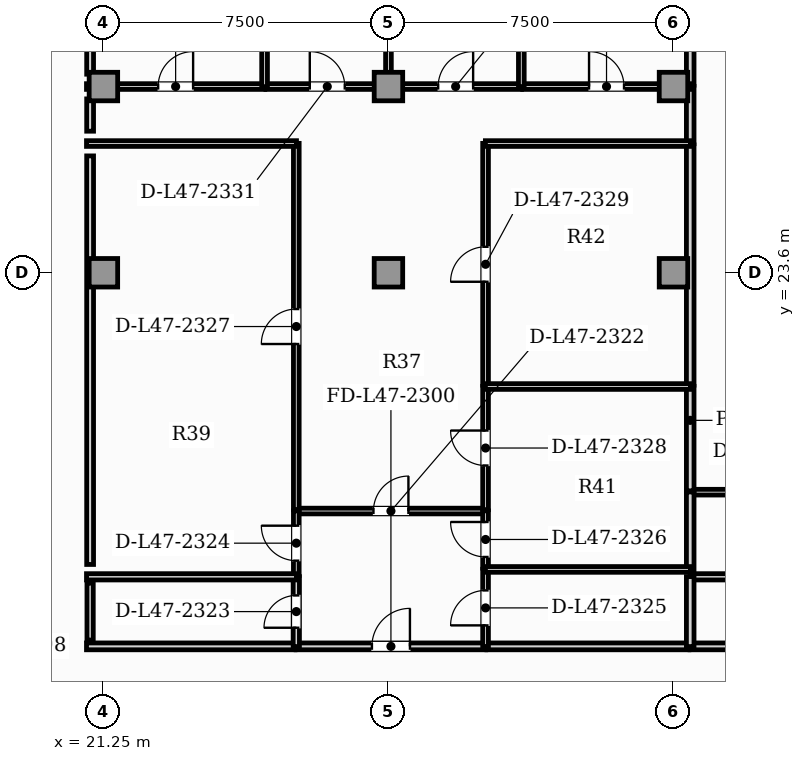
"""IFC4 building model, lengths in metres.
Left out: names, types, materials, properties, quantities, classifications, styles, units other than length and angle.
Written with IfcOpenShell. Run it as: python <this file> out.ifc"""

import sys

from ifc_helpers import new_model, si_unit, direction, frame, frame_2d, origin, origin_2d, place, context, subcontext, project, spatial, rectangle, extrude, element, fill, save


model = new_model("IFC4")
c1 = context("Model", 3, precision=1e-05, world=origin(), true_north=direction((0.0, 1.0)))
c2 = subcontext(c1, "Body", "Model", "MODEL_VIEW")
j1 = project(units=[si_unit("LENGTHUNIT", "METRE"), si_unit("PLANEANGLEUNIT", "RADIAN")], contexts=[c1])
p1 = place(None, origin())
s1 = spatial("IfcSite", under=j1, at=p1, CompositionType="ELEMENT")
p2 = place(p1, origin())
s2 = spatial("IfcBuilding", under=s1, at=p2, CompositionType="ELEMENT")
p3 = place(p2, frame((0.0, 0.0, 192.6)))
s3 = spatial("IfcBuildingStorey", under=s2, at=p3, CompositionType="ELEMENT", Elevation=192.6)
for number, where, z_axis, x_axis in (
    (1, (21.25, 23.6, 0.0), (0.0, 0.0, 1.0), (1.0, 0.0, 0.0)),
    (2, (28.75, 23.6, 0.0), (0.0, 0.0, 1.0), (1.0, 0.0, 0.0)),
    (3, (36.25, 23.6, 0.0), (0.0, 0.0, 1.0), (1.0, 0.0, 0.0)),
    (4, (21.25, 28.5, 0.0), (0.0, 0.0, 1.0), (1.0, 0.0, 0.0)),
    (5, (28.75, 28.5, 0.0), (0.0, 0.0, 1.0), (1.0, 0.0, 0.0)),
    (6, (36.25, 28.5, 0.0), (0.0, 0.0, 1.0), (1.0, 0.0, 0.0)),
):
    element("IfcColumn", number, at=place(p3, frame(where, z_axis=z_axis, x_axis=x_axis)), inside=s3, PredefinedType="COLUMN", context=c2, shape_type="SweptSolid", body=[
        extrude(rectangle(XDim=0.75, YDim=0.75, at=origin_2d()), origin(), (0.0, 0.0, 1.0), 3.85),
    ])
p4 = place(p3, frame((36.685, 13.77, 0.0), z_axis=(0.0, 0.0, 1.0), x_axis=(1.0, 0.0, 0.0)))
e7 = element("IfcWall", 7, at=p4, inside=s3, PredefinedType="PARTITIONING", context=c2, shape_type="SweptSolid", body=[
    extrude(rectangle(XDim=4.84, YDim=0.18, at=frame_2d((2.42, 0.0))), origin(), (0.0, 0.0, 1.0), 3.63),
])
p5 = place(p3, frame((26.32, 13.77, 0.0), z_axis=(0.0, 0.0, 1.0), x_axis=(1.0, 0.0, 0.0)))
e8 = element("IfcWall", 8, at=p5, inside=s3, PredefinedType="PARTITIONING", context=c2, shape_type="SweptSolid", body=[
    extrude(rectangle(XDim=4.99, YDim=0.18, at=frame_2d((2.495, 0.0))), origin(), (0.0, 0.0, 1.0), 3.63),
])
p6 = place(p5, frame((1.995, 0.0, 0.0)))
e9 = element("IfcOpeningElement", 9, at=p6, cuts=e8, PredefinedType="OPENING", context=c2, shape_type="SweptSolid", body=[
    extrude(rectangle(XDim=1.0, YDim=2.15, at=frame_2d((0.5, 1.075))), frame((0.0, 0.1, 0.0), z_axis=(0.0, -1.0, 0.0), x_axis=(1.0, 0.0, 0.0)), (0.0, 0.0, 1.0), 0.2),
])
p7 = place(p3, frame((20.805, 13.77, 0.0), z_axis=(0.0, 0.0, 1.0), x_axis=(1.0, 0.0, 0.0)))
e10 = element("IfcWall", 10, at=p7, inside=s3, PredefinedType="PARTITIONING", context=c2, shape_type="SweptSolid", body=[
    extrude(rectangle(XDim=5.485, YDim=0.18, at=frame_2d((2.743, 0.0))), origin(), (0.0, 0.0, 1.0), 3.63),
])
p8 = place(p3, frame((31.34, 13.77, 0.0), z_axis=(0.0, 0.0, 1.0), x_axis=(1.0, 0.0, 0.0)))
e11 = element("IfcWall", 11, at=p8, inside=s3, PredefinedType="PARTITIONING", context=c2, shape_type="SweptSolid", body=[
    extrude(rectangle(XDim=5.315, YDim=0.18, at=frame_2d((2.657, 0.0))), origin(), (0.0, 0.0, 1.0), 3.63),
])
p9 = place(p3, frame((36.685, 15.6, 0.0), z_axis=(0.0, 0.0, 1.0), x_axis=(1.0, 0.0, 0.0)))
e12 = element("IfcWall", 12, at=p9, inside=s3, PredefinedType="PLUMBINGWALL", context=c2, shape_type="SweptSolid", body=[
    extrude(rectangle(XDim=4.88, YDim=0.165, at=frame_2d((2.44, 0.0))), origin(), (0.0, 0.0, 1.0), 3.63),
])
p10 = place(p3, frame((36.69, 13.765, 0.0), z_axis=(0.0, 0.0, 1.0), x_axis=(0.0, 1.0, 0.0)))
e13 = element("IfcWall", 13, at=p10, inside=s3, PredefinedType="PARTITIONING", context=c2, shape_type="SweptSolid", body=[
    extrude(rectangle(XDim=1.84, YDim=0.2, at=frame_2d((0.92, 0.0))), origin(), (0.0, 0.0, 1.0), 3.63),
])
p11 = place(p3, frame((36.685, 17.827, 0.0), z_axis=(0.0, 0.0, 1.0), x_axis=(1.0, 0.0, 0.0)))
e14 = element("IfcWall", 14, at=p11, inside=s3, PredefinedType="PARTITIONING", context=c2, shape_type="SweptSolid", body=[
    extrude(rectangle(XDim=4.88, YDim=0.15, at=frame_2d((2.44, 0.0))), origin(), (0.0, 0.0, 1.0), 3.63),
])
p12 = place(p3, frame((36.69, 15.79, 0.0), z_axis=(0.0, 0.0, 1.0), x_axis=(0.0, 1.0, 0.0)))
e15 = element("IfcWall", 15, at=p12, inside=s3, PredefinedType="PARTITIONING", context=c2, shape_type="SweptSolid", body=[
    extrude(rectangle(XDim=2.042, YDim=0.2, at=frame_2d((1.021, 0.0))), origin(), (0.0, 0.0, 1.0), 3.63),
])
p13 = place(p3, frame((36.69, 26.995, 0.0), z_axis=(0.0, 0.0, 1.0), x_axis=(0.0, 1.0, 0.0)))
e16 = element("IfcWall", 16, at=p13, inside=s3, PredefinedType="PARTITIONING", context=c2, shape_type="SweptSolid", body=[
    extrude(rectangle(XDim=1.51, YDim=0.2, at=frame_2d((0.755, 0.0))), origin(), (0.0, 0.0, 1.0), 3.63),
])
p14 = place(p3, frame((36.69, 17.862, 0.0), z_axis=(0.0, 0.0, 1.0), x_axis=(0.0, 1.0, 0.0)))
e17 = element("IfcWall", 17, at=p14, inside=s3, PredefinedType="PARTITIONING", context=c2, shape_type="SweptSolid", body=[
    extrude(rectangle(XDim=2.75, YDim=0.2, at=frame_2d((1.375, 0.0))), origin(), (0.0, 0.0, 1.0), 3.63),
])
p15 = place(p3, frame((36.69, 20.642, 0.0), z_axis=(0.0, 0.0, 1.0), x_axis=(0.0, 1.0, 0.0)))
e18 = element("IfcWall", 18, at=p15, inside=s3, PredefinedType="PARTITIONING", context=c2, shape_type="SweptSolid", body=[
    extrude(rectangle(XDim=6.323, YDim=0.2, at=frame_2d((3.162, 0.0))), origin(), (0.0, 0.0, 1.0), 3.63),
])
p16 = place(p3, frame((36.69, 28.535, 0.0), z_axis=(0.0, 0.0, 1.0), x_axis=(0.0, 1.0, 0.0)))
e19 = element("IfcWall", 19, at=p16, inside=s3, PredefinedType="PARTITIONING", context=c2, shape_type="SweptSolid", body=[
    extrude(rectangle(XDim=4.93, YDim=0.2, at=frame_2d((2.465, 0.0))), origin(), (0.0, 0.0, 1.0), 3.63),
])
p17 = place(p3, frame((26.32, 17.331, 0.0), z_axis=(0.0, 0.0, 1.0), x_axis=(1.0, 0.0, 0.0)))
e20 = element("IfcWall", 20, at=p17, inside=s3, PredefinedType="PARTITIONING", context=c2, shape_type="SweptSolid", body=[
    extrude(rectangle(XDim=4.99, YDim=0.15, at=frame_2d((2.495, 0.0))), origin(), (0.0, 0.0, 1.0), 3.63),
])
p18 = place(p17, frame((2.035, 0.0, 0.0)))
e21 = element("IfcOpeningElement", 21, at=p18, cuts=e20, PredefinedType="OPENING", context=c2, shape_type="SweptSolid", body=[
    extrude(rectangle(XDim=0.92, YDim=2.1, at=frame_2d((0.46, 1.05))), frame((0.0, 0.085, 0.0), z_axis=(0.0, -1.0, 0.0), x_axis=(1.0, 0.0, 0.0)), (0.0, 0.0, 1.0), 0.17),
])
p19 = place(p3, frame((26.325, 13.765, 0.0), z_axis=(0.0, 0.0, 1.0), x_axis=(0.0, 1.0, 0.0)))
e22 = element("IfcWall", 22, at=p19, inside=s3, PredefinedType="PLUMBINGWALL", context=c2, shape_type="SweptSolid", body=[
    extrude(rectangle(XDim=1.84, YDim=0.165, at=frame_2d((0.92, 0.0))), origin(), (0.0, 0.0, 1.0), 3.63),
])
p20 = place(p19, frame((0.495, 0.0, 0.0)))
e23 = element("IfcOpeningElement", 23, at=p20, cuts=e22, PredefinedType="OPENING", context=c2, shape_type="SweptSolid", body=[
    extrude(rectangle(XDim=0.85, YDim=2.1, at=frame_2d((0.425, 1.05))), frame((0.0, 0.093, 0.0), z_axis=(0.0, -1.0, 0.0), x_axis=(1.0, 0.0, 0.0)), (0.0, 0.0, 1.0), 0.185),
])
p21 = place(p3, frame((26.325, 15.635, 0.0), z_axis=(0.0, 0.0, 1.0), x_axis=(0.0, 1.0, 0.0)))
e24 = element("IfcWall", 24, at=p21, inside=s3, PredefinedType="PARTITIONING", context=c2, shape_type="SweptSolid", body=[
    extrude(rectangle(XDim=1.701, YDim=0.15, at=frame_2d((0.85, 0.0))), origin(), (0.0, 0.0, 1.0), 3.63),
])
p22 = place(p21, frame((0.39, 0.0, 0.0)))
e25 = element("IfcOpeningElement", 25, at=p22, cuts=e24, PredefinedType="OPENING", context=c2, shape_type="SweptSolid", body=[
    extrude(rectangle(XDim=0.92, YDim=2.1, at=frame_2d((0.46, 1.05))), frame((0.0, 0.085, 0.0), z_axis=(0.0, -1.0, 0.0), x_axis=(1.0, 0.0, 0.0)), (0.0, 0.0, 1.0), 0.17),
])
p23 = place(p3, frame((31.305, 13.765, 0.0), z_axis=(0.0, 0.0, 1.0), x_axis=(0.0, 1.0, 0.0)))
e26 = element("IfcWall", 26, at=p23, inside=s3, PredefinedType="PARTITIONING", context=c2, shape_type="SweptSolid", body=[
    extrude(rectangle(XDim=2.035, YDim=0.15, at=frame_2d((1.017, 0.0))), origin(), (0.0, 0.0, 1.0), 3.63),
])
p24 = place(p23, frame((0.557, 0.0, 0.0)))
e27 = element("IfcOpeningElement", 27, at=p24, cuts=e26, PredefinedType="OPENING", context=c2, shape_type="SweptSolid", body=[
    extrude(rectangle(XDim=0.92, YDim=2.1, at=frame_2d((0.46, 1.05))), frame((0.0, 0.085, 0.0), z_axis=(0.0, -1.0, 0.0), x_axis=(1.0, 0.0, 0.0)), (0.0, 0.0, 1.0), 0.17),
])
p25 = place(p3, frame((31.305, 15.83, 0.0), z_axis=(0.0, 0.0, 1.0), x_axis=(0.0, 1.0, 0.0)))
e28 = element("IfcWall", 28, at=p25, inside=s3, PredefinedType="PARTITIONING", context=c2, shape_type="SweptSolid", body=[
    extrude(rectangle(XDim=1.506, YDim=0.15, at=frame_2d((0.753, 0.0))), origin(), (0.0, 0.0, 1.0), 3.63),
])
p26 = place(p25, frame((0.293, 0.0, 0.0)))
e29 = element("IfcOpeningElement", 29, at=p26, cuts=e28, PredefinedType="OPENING", context=c2, shape_type="SweptSolid", body=[
    extrude(rectangle(XDim=0.92, YDim=2.1, at=frame_2d((0.46, 1.05))), frame((0.0, 0.085, 0.0), z_axis=(0.0, -1.0, 0.0), x_axis=(1.0, 0.0, 0.0)), (0.0, 0.0, 1.0), 0.17),
])
p27 = place(p3, frame((26.325, 17.366, 0.0), z_axis=(0.0, 0.0, 1.0), x_axis=(0.0, 1.0, 0.0)))
e30 = element("IfcWall", 30, at=p27, inside=s3, PredefinedType="PARTITIONING", context=c2, shape_type="SweptSolid", body=[
    extrude(rectangle(XDim=9.639, YDim=0.15, at=frame_2d((4.82, 0.0))), origin(), (0.0, 0.0, 1.0), 3.63),
])
p28 = place(p27, frame((4.36, 0.0, 0.0)))
e31 = element("IfcOpeningElement", 31, at=p28, cuts=e30, PredefinedType="OPENING", context=c2, shape_type="SweptSolid", body=[
    extrude(rectangle(XDim=0.92, YDim=2.1, at=frame_2d((0.46, 1.05))), frame((0.0, 0.085, 0.0), z_axis=(0.0, -1.0, 0.0), x_axis=(1.0, 0.0, 0.0)), (0.0, 0.0, 1.0), 0.17),
])
p29 = place(p3, frame((20.805, 27.0, 0.0), z_axis=(0.0, 0.0, 1.0), x_axis=(1.0, 0.0, 0.0)))
e32 = element("IfcWall", 32, at=p29, inside=s3, PredefinedType="PARTITIONING", context=c2, shape_type="SweptSolid", body=[
    extrude(rectangle(XDim=5.525, YDim=0.15, at=frame_2d((2.763, 0.0))), origin(), (0.0, 0.0, 1.0), 3.63),
])
p30 = place(p3, frame((31.305, 17.366, 0.0), z_axis=(0.0, 0.0, 1.0), x_axis=(0.0, 1.0, 0.0)))
e33 = element("IfcWall", 33, at=p30, inside=s3, PredefinedType="PARTITIONING", context=c2, shape_type="SweptSolid", body=[
    extrude(rectangle(XDim=3.246, YDim=0.15, at=frame_2d((1.623, 0.0))), origin(), (0.0, 0.0, 1.0), 3.63),
])
p31 = place(p30, frame((1.163, 0.0, 0.0)))
e34 = element("IfcOpeningElement", 34, at=p31, cuts=e33, PredefinedType="OPENING", context=c2, shape_type="SweptSolid", body=[
    extrude(rectangle(XDim=0.92, YDim=2.1, at=frame_2d((0.46, 1.05))), frame((0.0, 0.085, 0.0), z_axis=(0.0, -1.0, 0.0), x_axis=(1.0, 0.0, 0.0)), (0.0, 0.0, 1.0), 0.17),
])
p32 = place(p3, frame((31.305, 20.642, 0.0), z_axis=(0.0, 0.0, 1.0), x_axis=(0.0, 1.0, 0.0)))
e35 = element("IfcWall", 35, at=p32, inside=s3, PredefinedType="PARTITIONING", context=c2, shape_type="SweptSolid", body=[
    extrude(rectangle(XDim=6.363, YDim=0.15, at=frame_2d((3.182, 0.0))), origin(), (0.0, 0.0, 1.0), 3.63),
])
p33 = place(p32, frame((2.721, 0.0, 0.0)))
e36 = element("IfcOpeningElement", 36, at=p33, cuts=e35, PredefinedType="OPENING", context=c2, shape_type="SweptSolid", body=[
    extrude(rectangle(XDim=0.92, YDim=2.1, at=frame_2d((0.46, 1.05))), frame((0.0, 0.085, 0.0), z_axis=(0.0, -1.0, 0.0), x_axis=(1.0, 0.0, 0.0)), (0.0, 0.0, 1.0), 0.17),
])
p34 = place(p3, frame((31.3, 27.0, 0.0), z_axis=(0.0, 0.0, 1.0), x_axis=(1.0, 0.0, 0.0)))
e37 = element("IfcWall", 37, at=p34, inside=s3, PredefinedType="PARTITIONING", context=c2, shape_type="SweptSolid", body=[
    extrude(rectangle(XDim=5.395, YDim=0.15, at=frame_2d((2.697, 0.0))), origin(), (0.0, 0.0, 1.0), 3.63),
])
p35 = place(p3, frame((20.805, 28.5, 0.0), z_axis=(0.0, 0.0, 1.0), x_axis=(1.0, 0.0, 0.0)))
e38 = element("IfcWall", 38, at=p35, inside=s3, PredefinedType="PARTITIONING", context=c2, shape_type="SweptSolid", body=[
    extrude(rectangle(XDim=4.691, YDim=0.15, at=frame_2d((2.345, 0.0))), origin(), (0.0, 0.0, 1.0), 3.63),
])
p36 = place(p35, frame((1.885, 0.0, 0.0)))
e39 = element("IfcOpeningElement", 39, at=p36, cuts=e38, PredefinedType="OPENING", context=c2, shape_type="SweptSolid", body=[
    extrude(rectangle(XDim=0.92, YDim=2.1, at=frame_2d((0.46, 1.05))), frame((0.0, 0.085, 0.0), z_axis=(0.0, -1.0, 0.0), x_axis=(1.0, 0.0, 0.0)), (0.0, 0.0, 1.0), 0.17),
])
p37 = place(p3, frame((25.526, 28.5, 0.0), z_axis=(0.0, 0.0, 1.0), x_axis=(1.0, 0.0, 0.0)))
e40 = element("IfcWall", 40, at=p37, inside=s3, PredefinedType="PARTITIONING", context=c2, shape_type="SweptSolid", body=[
    extrude(rectangle(XDim=3.229, YDim=0.15, at=frame_2d((1.615, 0.0))), origin(), (0.0, 0.0, 1.0), 3.63),
])
p38 = place(p37, frame((1.155, 0.0, 0.0)))
e41 = element("IfcOpeningElement", 41, at=p38, cuts=e40, PredefinedType="OPENING", context=c2, shape_type="SweptSolid", body=[
    extrude(rectangle(XDim=0.92, YDim=2.1, at=frame_2d((0.46, 1.05))), frame((0.0, 0.085, 0.0), z_axis=(0.0, -1.0, 0.0), x_axis=(1.0, 0.0, 0.0)), (0.0, 0.0, 1.0), 0.17),
])
p39 = place(p3, frame((28.785, 28.5, 0.0), z_axis=(0.0, 0.0, 1.0), x_axis=(1.0, 0.0, 0.0)))
e42 = element("IfcWall", 42, at=p39, inside=s3, PredefinedType="PARTITIONING", context=c2, shape_type="SweptSolid", body=[
    extrude(rectangle(XDim=3.466, YDim=0.15, at=frame_2d((1.733, 0.0))), origin(), (0.0, 0.0, 1.0), 3.63),
])
p40 = place(p39, frame((1.273, 0.0, 0.0)))
e43 = element("IfcOpeningElement", 43, at=p40, cuts=e42, PredefinedType="OPENING", context=c2, shape_type="SweptSolid", body=[
    extrude(rectangle(XDim=0.92, YDim=2.1, at=frame_2d((0.46, 1.05))), frame((0.0, 0.085, 0.0), z_axis=(0.0, -1.0, 0.0), x_axis=(1.0, 0.0, 0.0)), (0.0, 0.0, 1.0), 0.17),
])
p41 = place(p3, frame((32.281, 28.5, 0.0), z_axis=(0.0, 0.0, 1.0), x_axis=(1.0, 0.0, 0.0)))
e44 = element("IfcWall", 44, at=p41, inside=s3, PredefinedType="PARTITIONING", context=c2, shape_type="SweptSolid", body=[
    extrude(rectangle(XDim=4.414, YDim=0.15, at=frame_2d((2.207, 0.0))), origin(), (0.0, 0.0, 1.0), 3.63),
])
p42 = place(p41, frame((1.747, 0.0, 0.0)))
e45 = element("IfcOpeningElement", 45, at=p42, cuts=e44, PredefinedType="OPENING", context=c2, shape_type="SweptSolid", body=[
    extrude(rectangle(XDim=0.92, YDim=2.1, at=frame_2d((0.46, 1.05))), frame((0.0, 0.085, 0.0), z_axis=(0.0, -1.0, 0.0), x_axis=(1.0, 0.0, 0.0)), (0.0, 0.0, 1.0), 0.17),
])
p43 = place(p3, frame((20.805, 15.6, 0.0), z_axis=(0.0, 0.0, 1.0), x_axis=(1.0, 0.0, 0.0)))
e46 = element("IfcWall", 46, at=p43, inside=s3, PredefinedType="PLUMBINGWALL", context=c2, shape_type="SweptSolid", body=[
    extrude(rectangle(XDim=5.525, YDim=0.165, at=frame_2d((2.763, 0.0))), origin(), (0.0, 0.0, 1.0), 3.63),
])
for number, where, z_axis, x_axis in (
    (47, (31.3, 15.794, 0.0), (0.0, 0.0, 1.0), (1.0, 0.0, 0.0)),
    (48, (31.3, 20.607, 0.0), (0.0, 0.0, 1.0), (1.0, 0.0, 0.0)),
):
    element("IfcWall", number, at=place(p3, frame(where, z_axis=z_axis, x_axis=x_axis)), inside=s3, PredefinedType="PARTITIONING", context=c2, shape_type="SweptSolid", body=[
        extrude(rectangle(XDim=5.395, YDim=0.15, at=frame_2d((2.697, 0.0))), origin(), (0.0, 0.0, 1.0), 3.63),
    ])
p44 = place(p3, frame((25.49, 28.495, 0.0), z_axis=(0.0, 0.0, 1.0), x_axis=(0.0, 1.0, 0.0)))
e49 = element("IfcWall", 49, at=p44, inside=s3, PredefinedType="PARTITIONING", context=c2, shape_type="SweptSolid", body=[
    extrude(rectangle(XDim=7.632, YDim=0.15, at=frame_2d((3.816, 0.0))), origin(), (0.0, 0.0, 1.0), 3.63),
])
p45 = place(p3, frame((28.75, 28.495, 0.0), z_axis=(0.0, 0.0, 1.0), x_axis=(0.0, 1.0, 0.0)))
e50 = element("IfcWall", 50, at=p45, inside=s3, PredefinedType="PARTITIONING", context=c2, shape_type="SweptSolid", body=[
    extrude(rectangle(XDim=7.632, YDim=0.15, at=frame_2d((3.816, 0.0))), origin(), (0.0, 0.0, 1.0), 3.223),
])
p46 = place(p3, frame((32.246, 28.495, 0.0), z_axis=(0.0, 0.0, 1.0), x_axis=(0.0, 1.0, 0.0)))
e51 = element("IfcWall", 51, at=p46, inside=s3, PredefinedType="PARTITIONING", context=c2, shape_type="SweptSolid", body=[
    extrude(rectangle(XDim=7.632, YDim=0.15, at=frame_2d((3.816, 0.0))), origin(), (0.0, 0.0, 1.0), 3.63),
])
p47 = place(p3, frame((20.9, 27.325, 0.0), z_axis=(0.0, 0.0, 1.0), x_axis=(0.0, 1.0, 0.0)))
e52 = element("IfcWall", 52, at=p47, inside=s3, PredefinedType="PARTITIONING", context=c2, shape_type="SweptSolid", body=[
    extrude(rectangle(XDim=0.85, YDim=0.18, at=frame_2d((0.425, 0.0))), origin(), (0.0, 0.0, 1.0), 3.63),
])
p48 = place(p3, frame((20.9, 13.935, 0.0), z_axis=(0.0, 0.0, 1.0), x_axis=(0.0, 1.0, 0.0)))
e53 = element("IfcWall", 53, at=p48, inside=s3, PredefinedType="PLUMBINGWALL", context=c2, shape_type="SweptSolid", body=[
    extrude(rectangle(XDim=1.5, YDim=0.165, at=frame_2d((0.75, 0.0))), origin(), (0.0, 0.0, 1.0), 3.63),
])
p49 = place(p3, frame((20.9, 15.925, 0.0), z_axis=(0.0, 0.0, 1.0), x_axis=(0.0, 1.0, 0.0)))
e54 = element("IfcWall", 54, at=p49, inside=s3, PredefinedType="PARTITIONING", context=c2, shape_type="SweptSolid", body=[
    extrude(rectangle(XDim=10.75, YDim=0.18, at=frame_2d((5.375, 0.0))), origin(), (0.0, 0.0, 1.0), 3.63),
])
p50 = place(p3, frame((20.9, 28.825, 0.0), z_axis=(0.0, 0.0, 1.0), x_axis=(0.0, 1.0, 0.0)))
e55 = element("IfcWall", 55, at=p50, inside=s3, PredefinedType="PARTITIONING", context=c2, shape_type="SweptSolid", body=[
    extrude(rectangle(XDim=7.302, YDim=0.18, at=frame_2d((3.651, 0.0))), origin(), (0.0, 0.0, 1.0), 3.63),
])
p51 = place(p6, origin())
e56 = element("IfcDoor", 56, at=p51, inside=s3, OperationType="SINGLE_SWING_RIGHT", PredefinedType="DOOR", context=c2, shape_type="SweptSolid", body=[
    extrude(rectangle(XDim=1.0, YDim=2.15, at=frame_2d((0.5, 1.075))), frame((0.0, 0.025, 0.0), z_axis=(0.0, -1.0, 0.0), x_axis=(1.0, 0.0, 0.0)), (0.0, 0.0, 1.0), 0.05),
])
fill(e9, e56)
p52 = place(p18, origin())
e57 = element("IfcDoor", 57, at=p52, inside=s3, OperationType="SINGLE_SWING_RIGHT", PredefinedType="DOOR", context=c2, shape_type="SweptSolid", body=[
    extrude(rectangle(XDim=0.92, YDim=2.1, at=frame_2d((0.46, 1.05))), frame((0.0, 0.025, 0.0), z_axis=(0.0, -1.0, 0.0), x_axis=(1.0, 0.0, 0.0)), (0.0, 0.0, 1.0), 0.05),
])
fill(e21, e57)
p53 = place(p20, origin())
e58 = element("IfcDoor", 58, at=p53, inside=s3, OperationType="SINGLE_SWING_LEFT", PredefinedType="DOOR", context=c2, shape_type="SweptSolid", body=[
    extrude(rectangle(XDim=0.85, YDim=2.1, at=frame_2d((0.425, 1.05))), frame((0.0, 0.025, 0.0), z_axis=(0.0, -1.0, 0.0), x_axis=(1.0, 0.0, 0.0)), (0.0, 0.0, 1.0), 0.05),
])
fill(e23, e58)
p54 = place(p22, origin())
e59 = element("IfcDoor", 59, at=p54, inside=s3, OperationType="SINGLE_SWING_RIGHT", PredefinedType="DOOR", context=c2, shape_type="SweptSolid", body=[
    extrude(rectangle(XDim=0.92, YDim=2.1, at=frame_2d((0.46, 1.05))), frame((0.0, 0.025, 0.0), z_axis=(0.0, -1.0, 0.0), x_axis=(1.0, 0.0, 0.0)), (0.0, 0.0, 1.0), 0.05),
])
fill(e25, e59)
p55 = place(p24, origin())
e60 = element("IfcDoor", 60, at=p55, inside=s3, OperationType="SINGLE_SWING_LEFT", PredefinedType="DOOR", context=c2, shape_type="SweptSolid", body=[
    extrude(rectangle(XDim=0.92, YDim=2.1, at=frame_2d((0.46, 1.05))), frame((0.0, 0.025, 0.0), z_axis=(0.0, -1.0, 0.0), x_axis=(1.0, 0.0, 0.0)), (0.0, 0.0, 1.0), 0.05),
])
fill(e27, e60)
p56 = place(p26, origin())
e61 = element("IfcDoor", 61, at=p56, inside=s3, OperationType="SINGLE_SWING_RIGHT", PredefinedType="DOOR", context=c2, shape_type="SweptSolid", body=[
    extrude(rectangle(XDim=0.92, YDim=2.1, at=frame_2d((0.46, 1.05))), frame((0.0, 0.025, 0.0), z_axis=(0.0, -1.0, 0.0), x_axis=(1.0, 0.0, 0.0)), (0.0, 0.0, 1.0), 0.05),
])
fill(e29, e61)
p57 = place(p28, origin())
e62 = element("IfcDoor", 62, at=p57, inside=s3, OperationType="SINGLE_SWING_LEFT", PredefinedType="DOOR", context=c2, shape_type="SweptSolid", body=[
    extrude(rectangle(XDim=0.92, YDim=2.1, at=frame_2d((0.46, 1.05))), frame((0.0, 0.025, 0.0), z_axis=(0.0, -1.0, 0.0), x_axis=(1.0, 0.0, 0.0)), (0.0, 0.0, 1.0), 0.05),
])
fill(e31, e62)
p58 = place(p31, origin())
e63 = element("IfcDoor", 63, at=p58, inside=s3, OperationType="SINGLE_SWING_RIGHT", PredefinedType="DOOR", context=c2, shape_type="SweptSolid", body=[
    extrude(rectangle(XDim=0.92, YDim=2.1, at=frame_2d((0.46, 1.05))), frame((0.0, 0.025, 0.0), z_axis=(0.0, -1.0, 0.0), x_axis=(1.0, 0.0, 0.0)), (0.0, 0.0, 1.0), 0.05),
])
fill(e34, e63)
p59 = place(p33, origin())
e64 = element("IfcDoor", 64, at=p59, inside=s3, OperationType="SINGLE_SWING_LEFT", PredefinedType="DOOR", context=c2, shape_type="SweptSolid", body=[
    extrude(rectangle(XDim=0.92, YDim=2.1, at=frame_2d((0.46, 1.05))), frame((0.0, 0.025, 0.0), z_axis=(0.0, -1.0, 0.0), x_axis=(1.0, 0.0, 0.0)), (0.0, 0.0, 1.0), 0.05),
])
fill(e36, e64)
p60 = place(p36, origin())
e65 = element("IfcDoor", 65, at=p60, inside=s3, OperationType="SINGLE_SWING_RIGHT", PredefinedType="DOOR", context=c2, shape_type="SweptSolid", body=[
    extrude(rectangle(XDim=0.92, YDim=2.1, at=frame_2d((0.46, 1.05))), frame((0.0, 0.025, 0.0), z_axis=(0.0, -1.0, 0.0), x_axis=(1.0, 0.0, 0.0)), (0.0, 0.0, 1.0), 0.05),
])
fill(e39, e65)
p61 = place(p38, origin())
e66 = element("IfcDoor", 66, at=p61, inside=s3, OperationType="SINGLE_SWING_LEFT", PredefinedType="DOOR", context=c2, shape_type="SweptSolid", body=[
    extrude(rectangle(XDim=0.92, YDim=2.1, at=frame_2d((0.46, 1.05))), frame((0.0, 0.025, 0.0), z_axis=(0.0, -1.0, 0.0), x_axis=(1.0, 0.0, 0.0)), (0.0, 0.0, 1.0), 0.05),
])
fill(e41, e66)
p62 = place(p40, origin())
e67 = element("IfcDoor", 67, at=p62, inside=s3, OperationType="SINGLE_SWING_RIGHT", PredefinedType="DOOR", context=c2, shape_type="SweptSolid", body=[
    extrude(rectangle(XDim=0.92, YDim=2.1, at=frame_2d((0.46, 1.05))), frame((0.0, 0.025, 0.0), z_axis=(0.0, -1.0, 0.0), x_axis=(1.0, 0.0, 0.0)), (0.0, 0.0, 1.0), 0.05),
])
fill(e43, e67)
p63 = place(p42, origin())
e68 = element("IfcDoor", 68, at=p63, inside=s3, OperationType="SINGLE_SWING_LEFT", PredefinedType="DOOR", context=c2, shape_type="SweptSolid", body=[
    extrude(rectangle(XDim=0.92, YDim=2.1, at=frame_2d((0.46, 1.05))), frame((0.0, 0.025, 0.0), z_axis=(0.0, -1.0, 0.0), x_axis=(1.0, 0.0, 0.0)), (0.0, 0.0, 1.0), 0.05),
])
fill(e45, e68)
save(model, sys.argv[1])
